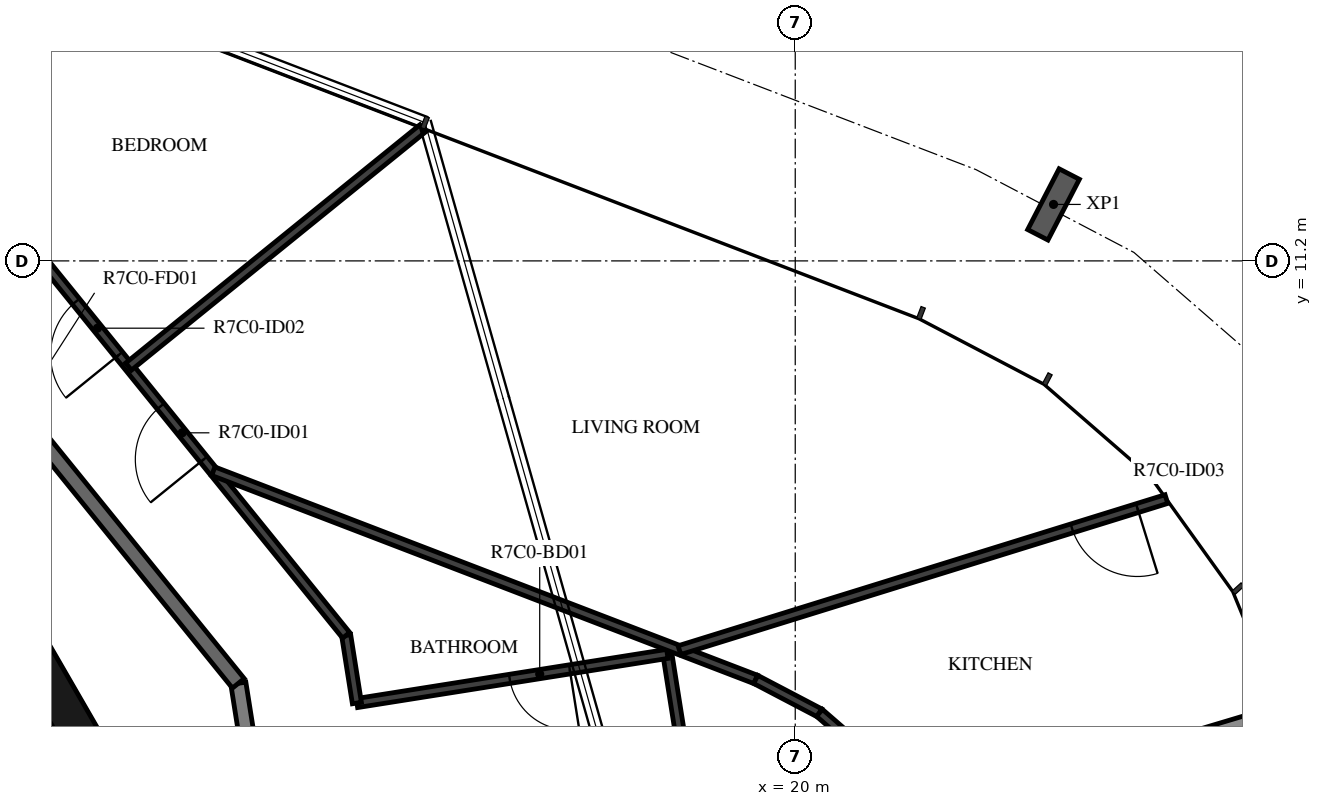
"""IFC4 building model, lengths in metres.
Left out: names, types, materials, properties, quantities, classifications, styles, units other than length and angle.
Written with IfcOpenShell. Run it as: python <this file> out.ifc"""

import sys

from ifc_helpers import new_model, si_unit, direction, frame, frame_2d, origin, origin_2d, place, context, subcontext, project, spatial, rectangle, i_section, extrude, element, fill, save


model = new_model("IFC4")
c1 = context("Model", 3, precision=1e-05, world=origin(), true_north=direction((0.0, 1.0)))
c2 = subcontext(c1, "Body", "Model", "MODEL_VIEW")
j1 = project(units=[si_unit("LENGTHUNIT", "METRE"), si_unit("PLANEANGLEUNIT", "RADIAN")], contexts=[c1])
p1 = place(None, origin())
s1 = spatial("IfcSite", under=j1, at=p1, CompositionType="ELEMENT")
p2 = place(p1, origin())
s2 = spatial("IfcBuilding", under=s1, at=p2, CompositionType="ELEMENT")
p3 = place(p2, frame((0.0, 0.0, 284.4)))
s3 = spatial("IfcBuildingStorey", under=s2, at=p3, CompositionType="ELEMENT", Elevation=284.4)
p4 = place(p3, frame((23.398, 11.943, -0.38), z_axis=(0.0, 0.0, 1.0), x_axis=(0.888285893192, -0.45929094478, 0.0)))
e1 = element("IfcColumn", 1, at=p4, inside=s3, PredefinedType="COLUMN", context=c2, shape_type="SweptSolid", body=[
    extrude(i_section(OverallWidth=0.3, OverallDepth=0.9, WebThickness=0.019, FlangeThickness=0.035, FilletRadius=0.03, at=origin_2d()), origin(), (0.0, 0.0, 1.0), 3.5),
])
p5 = place(p3, frame((10.845, 4.51, 0.0), z_axis=(0.0, 0.0, 1.0), x_axis=(-0.500087131594, 0.865975092491, 0.0)))
e2 = element("IfcWall", 2, at=p5, inside=s3, PredefinedType="SHEAR", context=c2, shape_type="SweptSolid", body=[
    extrude(rectangle(XDim=3.033, YDim=0.5, at=frame_2d((1.516, 0.0))), origin(), (0.0, 0.0, 1.0), 3.12),
])
p6 = place(p3, frame((13.797, -1.45, 0.0), z_axis=(0.0, 0.0, 1.0), x_axis=(-0.156421704315, 0.987690361611, 0.0)))
e3 = element("IfcWall", 3, at=p6, inside=s3, PredefinedType="STANDARD", context=c2, shape_type="SweptSolid", body=[
    extrude(rectangle(XDim=7.181, YDim=0.2, at=frame_2d((3.591, 0.0))), origin(), (0.0, 0.0, 1.0), 3.12),
])
p7 = place(p3, frame((12.673, 5.643, 0.0), z_axis=(0.0, 0.0, 1.0), x_axis=(-0.629302871585, 0.777160148113, 0.0)))
e4 = element("IfcWall", 4, at=p7, inside=s3, PredefinedType="STANDARD", context=c2, shape_type="SweptSolid", body=[
    extrude(rectangle(XDim=7.181, YDim=0.2, at=frame_2d((3.59, 0.0))), origin(), (0.0, 0.0, 1.0), 3.12),
])
p8 = place(p7, frame((4.1, 0.0, 0.0)))
e5 = element("IfcOpeningElement", 5, at=p8, cuts=e4, PredefinedType="OPENING", context=c2, shape_type="SweptSolid", body=[
    extrude(rectangle(XDim=1.0, YDim=2.1, at=frame_2d((0.5, 1.05))), frame((0.0, 0.11, 0.0), z_axis=(0.0, -1.0, 0.0), x_axis=(1.0, 0.0, 0.0)), (0.0, 0.0, 1.0), 0.22),
])
p9 = place(p3, frame((20.209, 3.405, 0.0), z_axis=(0.0, 0.0, 1.0), x_axis=(0.957991224208, 0.286797514529, 0.0)))
e6 = element("IfcWall", 6, at=p9, inside=s3, PredefinedType="STANDARD", context=c2, shape_type="SweptSolid", body=[
    extrude(rectangle(XDim=6.471, YDim=0.2, at=frame_2d((3.236, 0.0))), origin(), (0.0, 0.0, 1.0), 2.73),
])
p10 = place(p3, frame((18.572, 4.421, 0.0), z_axis=(0.0, 0.0, 1.0), x_axis=(-0.156347444306, 0.987702119396, 0.0)))
e7 = element("IfcWall", 7, at=p10, inside=s3, PredefinedType="PARTITIONING", context=c2, shape_type="SweptSolid", body=[
    extrude(rectangle(XDim=1.629, YDim=0.12, at=frame_2d((0.814, 0.0))), origin(), (0.0, 0.0, 1.0), 3.12),
])
p11 = place(p3, frame((18.317, 6.03, 0.0), z_axis=(0.0, 0.0, 1.0), x_axis=(-0.9876848128, -0.156456737039, 0.0)))
e8 = element("IfcWall", 8, at=p11, inside=s3, PredefinedType="PARTITIONING", context=c2, shape_type="SweptSolid", body=[
    extrude(rectangle(XDim=4.135, YDim=0.12, at=frame_2d((2.068, 0.0))), origin(), (0.0, 0.0, 1.0), 3.12),
])
p12 = place(p11, frame((1.3, 0.0, 0.0)))
e9 = element("IfcOpeningElement", 9, at=p12, cuts=e8, PredefinedType="OPENING", context=c2, shape_type="SweptSolid", body=[
    extrude(rectangle(XDim=0.8, YDim=2.1, at=frame_2d((0.4, 1.05))), frame((0.0, 0.07, 0.0), z_axis=(0.0, -1.0, 0.0), x_axis=(1.0, 0.0, 0.0)), (0.0, 0.0, 1.0), 0.14),
])
p13 = place(p3, frame((14.233, 5.383, 0.0), z_axis=(0.0, 0.0, 1.0), x_axis=(-0.156365428504, 0.987699272435, 0.0)))
e10 = element("IfcWall", 10, at=p13, inside=s3, PredefinedType="PARTITIONING", context=c2, shape_type="SweptSolid", body=[
    extrude(rectangle(XDim=0.902, YDim=0.12, at=frame_2d((0.451, 0.0))), origin(), (0.0, 0.0, 1.0), 3.12),
])
p14 = place(p3, frame((14.092, 6.274, 0.0), z_axis=(0.0, 0.0, 1.0), x_axis=(-0.62933367237, 0.777135206268, 0.0)))
e11 = element("IfcWall", 11, at=p14, inside=s3, PredefinedType="PARTITIONING", context=c2, shape_type="SweptSolid", body=[
    extrude(rectangle(XDim=7.985, YDim=0.12, at=frame_2d((3.992, 0.0))), origin(), (0.0, 0.0, 1.0), 3.12),
])
p15 = place(p14, frame((2.978, 0.0, 0.0)))
e12 = element("IfcOpeningElement", 12, at=p15, cuts=e11, PredefinedType="OPENING", context=c2, shape_type="SweptSolid", body=[
    extrude(rectangle(XDim=0.9, YDim=2.1, at=frame_2d((0.45, 1.05))), frame((0.0, 0.07, 0.0), z_axis=(0.0, -1.0, 0.0), x_axis=(1.0, 0.0, 0.0)), (0.0, 0.0, 1.0), 0.14),
])
p16 = place(p14, frame((4.749, 0.0, 0.0)))
e13 = element("IfcOpeningElement", 13, at=p16, cuts=e11, PredefinedType="OPENING", context=c2, shape_type="SweptSolid", body=[
    extrude(rectangle(XDim=0.9, YDim=2.1, at=frame_2d((0.45, 1.05))), frame((0.0, 0.07, 0.0), z_axis=(0.0, -1.0, 0.0), x_axis=(1.0, 0.0, 0.0)), (0.0, 0.0, 1.0), 0.14),
])
p17 = place(p3, frame((12.344, 8.433, 0.0), z_axis=(0.0, 0.0, 1.0), x_axis=(0.933573435176, -0.358386162029, 0.0)))
e14 = element("IfcWall", 14, at=p17, inside=s3, PredefinedType="PARTITIONING", context=c2, shape_type="SweptSolid", body=[
    extrude(rectangle(XDim=7.644, YDim=0.12, at=frame_2d((3.822, 0.0))), origin(), (0.0, 0.0, 1.0), 3.12),
])
p18 = place(p3, frame((19.48, 5.694, 0.0), z_axis=(0.0, 0.0, 1.0), x_axis=(0.885755816688, -0.464151519662, 0.0)))
e15 = element("IfcWall", 15, at=p18, inside=s3, PredefinedType="PARTITIONING", context=c2, shape_type="SweptSolid", body=[
    extrude(rectangle(XDim=0.947, YDim=0.12, at=frame_2d((0.473, 0.0))), origin(), (0.0, 0.0, 1.0), 3.12),
])
p19 = place(p3, frame((20.319, 5.254, 0.0), z_axis=(0.0, 0.0, 1.0), x_axis=(0.754646464307, -0.656131628493, 0.0)))
e16 = element("IfcWall", 16, at=p19, inside=s3, PredefinedType="PARTITIONING", context=c2, shape_type="SweptSolid", body=[
    extrude(rectangle(XDim=0.642, YDim=0.12, at=frame_2d((0.321, 0.0))), origin(), (0.0, 0.0, 1.0), 3.12),
])
p20 = place(p3, frame((24.883, 8.066, 0.0), z_axis=(0.0, 0.0, 1.0), x_axis=(-0.955106049863, -0.296264127958, 0.0)))
e17 = element("IfcWall", 17, at=p20, inside=s3, PredefinedType="PARTITIONING", context=c2, shape_type="SweptSolid", body=[
    extrude(rectangle(XDim=6.708, YDim=0.12, at=frame_2d((3.354, 0.0))), origin(), (0.0, 0.0, 1.0), 3.12),
])
p21 = place(p20, frame((0.4, 0.0, 0.0)))
e18 = element("IfcOpeningElement", 18, at=p21, cuts=e17, PredefinedType="OPENING", context=c2, shape_type="SweptSolid", body=[
    extrude(rectangle(XDim=0.9, YDim=2.1, at=frame_2d((0.45, 1.05))), frame((0.0, 0.07, 0.0), z_axis=(0.0, -1.0, 0.0), x_axis=(1.0, 0.0, 0.0)), (0.0, 0.0, 1.0), 0.14),
])
p22 = place(p3, frame((15.101, 12.945, 0.0), z_axis=(0.0, 0.0, 1.0), x_axis=(-0.777178675378, -0.629279990575, 0.0)))
e19 = element("IfcWall", 19, at=p22, inside=s3, PredefinedType="PARTITIONING", context=c2, shape_type="SweptSolid", body=[
    extrude(rectangle(XDim=4.982, YDim=0.12, at=frame_2d((2.491, 0.0))), origin(), (0.0, 0.0, 1.0), 3.12),
])
p23 = place(p12, origin())
e20 = element("IfcDoor", 20, at=p23, inside=s3, OperationType="SINGLE_SWING_LEFT", PredefinedType="DOOR", context=c2, shape_type="SweptSolid", body=[
    extrude(rectangle(XDim=0.8, YDim=2.1, at=frame_2d((0.4, 1.05))), frame((0.0, 0.025, 0.0), z_axis=(0.0, -1.0, 0.0), x_axis=(1.0, 0.0, 0.0)), (0.0, 0.0, 1.0), 0.05),
])
fill(e9, e20)
p24 = place(p15, origin())
e21 = element("IfcDoor", 21, at=p24, inside=s3, OperationType="SINGLE_SWING_LEFT", PredefinedType="DOOR", context=c2, shape_type="SweptSolid", body=[
    extrude(rectangle(XDim=0.9, YDim=2.1, at=frame_2d((0.45, 1.05))), frame((0.0, 0.025, 0.0), z_axis=(0.0, -1.0, 0.0), x_axis=(1.0, 0.0, 0.0)), (0.0, 0.0, 1.0), 0.05),
])
fill(e12, e21)
p25 = place(p16, origin())
e22 = element("IfcDoor", 22, at=p25, inside=s3, OperationType="SINGLE_SWING_LEFT", PredefinedType="DOOR", context=c2, shape_type="SweptSolid", body=[
    extrude(rectangle(XDim=0.9, YDim=2.1, at=frame_2d((0.45, 1.05))), frame((0.0, 0.025, 0.0), z_axis=(0.0, -1.0, 0.0), x_axis=(1.0, 0.0, 0.0)), (0.0, 0.0, 1.0), 0.05),
])
fill(e13, e22)
p26 = place(p21, origin())
e23 = element("IfcDoor", 23, at=p26, inside=s3, OperationType="SINGLE_SWING_LEFT", PredefinedType="DOOR", context=c2, shape_type="SweptSolid", body=[
    extrude(rectangle(XDim=0.9, YDim=2.1, at=frame_2d((0.45, 1.05))), frame((0.0, 0.025, 0.0), z_axis=(0.0, -1.0, 0.0), x_axis=(1.0, 0.0, 0.0)), (0.0, 0.0, 1.0), 0.05),
])
fill(e18, e23)
save(model, sys.argv[1])
